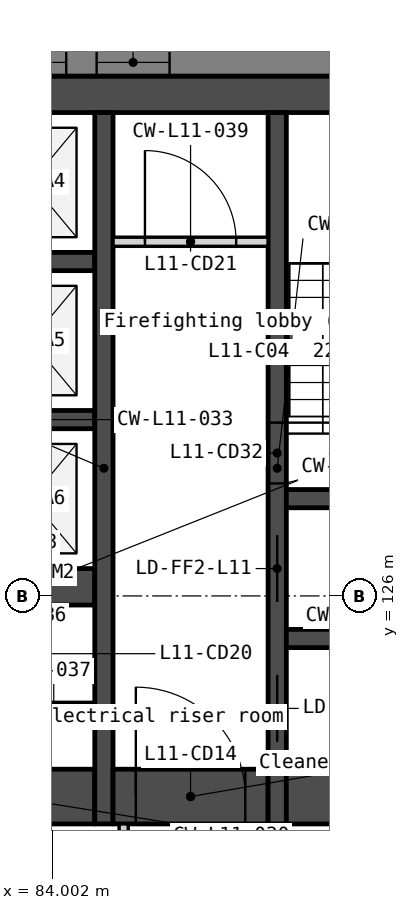
"""IFC4 building model, lengths in metres.
Left out: names, types, materials, properties, quantities, classifications, styles, units other than length and angle.
Written with IfcOpenShell. Run it as: python <this file> out.ifc"""

import sys

from ifc_helpers import new_model, si_unit, direction, frame, frame_2d, origin, place, context, subcontext, project, spatial, polyline, rectangle, outline, extrude, element, fill, save


model = new_model("IFC4")
c1 = context("Model", 3, precision=1e-05, world=origin(), true_north=direction((0.0, 1.0)))
c2 = subcontext(c1, "Body", "Model", "MODEL_VIEW")
j1 = project(units=[si_unit("LENGTHUNIT", "METRE"), si_unit("PLANEANGLEUNIT", "RADIAN")], contexts=[c1])
p1 = place(None, origin())
s1 = spatial("IfcSite", under=j1, at=p1, CompositionType="ELEMENT")
p2 = place(p1, origin())
s2 = spatial("IfcBuilding", under=s1, at=p2, CompositionType="ELEMENT")
p3 = place(p2, frame((0.0, 0.0, 52.5)))
s3 = spatial("IfcBuildingStorey", under=s2, at=p3, CompositionType="ELEMENT", Elevation=52.5)
p4 = place(p3, frame((66.0, 134.25, 0.0), z_axis=(0.0, 0.0, 1.0), x_axis=(1.0, 0.0, 0.0)))
e1 = element("IfcWall", 1, at=p4, inside=s3, PredefinedType="SOLIDWALL", context=c2, shape_type="SweptSolid", body=[
    extrude(rectangle(XDim=28.0, YDim=0.6, at=frame_2d((14.0, 0.0))), origin(), (0.0, 0.0, 1.0), 3.35),
])
p5 = place(p3, frame((81.8, 122.7, 0.0), z_axis=(0.0, 0.0, 1.0), x_axis=(1.0, 0.0, 0.0)))
e2 = element("IfcWall", 2, at=p5, inside=s3, PredefinedType="SOLIDWALL", context=c2, shape_type="SweptSolid", body=[
    extrude(rectangle(XDim=2.9, YDim=0.9, at=frame_2d((1.45, 0.0))), origin(), (0.0, 0.0, 1.0), 3.35),
])
p6 = place(p5, frame((0.05, 0.0, 0.0)))
e3 = element("IfcOpeningElement", 3, at=p6, cuts=e2, PredefinedType="OPENING", context=c2, shape_type="SweptSolid", body=[
    extrude(rectangle(XDim=1.5, YDim=2.1, at=frame_2d((0.75, 1.05))), frame((0.0, 0.46, 0.0), z_axis=(0.0, -1.0, 0.0), x_axis=(1.0, 0.0, 0.0)), (0.0, 0.0, 1.0), 0.92),
])
for number, where, z_axis, x_axis in (
    (4, (82.6, 131.5, 0.0), (0.0, 0.0, 1.0), (1.0, 0.0, 0.0)),
    (5, (82.6, 128.9, 0.0), (0.0, 0.0, 1.0), (1.0, 0.0, 0.0)),
):
    element("IfcWall", number, at=place(p3, frame(where, z_axis=z_axis, x_axis=x_axis)), inside=s3, PredefinedType="SOLIDWALL", context=c2, shape_type="SweptSolid", body=[
        extrude(rectangle(XDim=2.1, YDim=0.3, at=frame_2d((1.05, 0.0))), origin(), (0.0, 0.0, 1.0), 3.35),
    ])
p7 = place(p3, frame((82.6, 126.15, 0.0), z_axis=(0.0, 0.0, 1.0), x_axis=(1.0, 0.0, 0.0)))
e6 = element("IfcWall", 6, at=p7, inside=s3, PredefinedType="SOLIDWALL", context=c2, shape_type="SweptSolid", body=[
    extrude(rectangle(XDim=2.1, YDim=0.6, at=frame_2d((1.05, 0.0))), origin(), (0.0, 0.0, 1.0), 3.35),
])
p8 = place(p3, frame((83.35, 124.175, 0.0), z_axis=(0.0, 0.0, 1.0), x_axis=(1.0, 0.0, 0.0)))
e7 = element("IfcWall", 7, at=p8, inside=s3, PredefinedType="PARTITIONING", context=c2, shape_type="SweptSolid", body=[
    extrude(rectangle(XDim=1.35, YDim=0.15, at=frame_2d((0.675, 0.0))), origin(), (0.0, 0.0, 1.0), 3.35),
])
p9 = place(p3, frame((84.85, 133.95, 0.0), z_axis=(0.0, 0.0, 1.0), x_axis=(0.0, -1.0, 0.0)))
e8 = element("IfcWall", 8, at=p9, inside=s3, PredefinedType="SOLIDWALL", context=c2, shape_type="SweptSolid", body=[
    extrude(rectangle(XDim=11.7, YDim=0.3, at=frame_2d((5.85, 0.0))), origin(), (0.0, 0.0, 1.0), 3.35),
])
p10 = place(p3, frame((85.0, 131.825, 0.0), z_axis=(0.0, 0.0, 1.0), x_axis=(1.0, 0.0, 0.0)))
e9 = element("IfcWall", 9, at=p10, inside=s3, PredefinedType="PARTITIONING", context=c2, shape_type="SweptSolid", body=[
    extrude(rectangle(XDim=2.55, YDim=0.15, at=frame_2d((1.275, 0.0))), origin(), (0.0, 0.0, 1.0), 3.35),
])
p11 = place(p10, frame((0.525, 0.0, 0.0)))
e10 = element("IfcOpeningElement", 10, at=p11, cuts=e9, PredefinedType="OPENING", context=c2, shape_type="SweptSolid", body=[
    extrude(rectangle(XDim=1.5, YDim=2.1, at=frame_2d((0.75, 1.05))), frame((0.0, 0.085, 0.0), z_axis=(0.0, -1.0, 0.0), x_axis=(1.0, 0.0, 0.0)), (0.0, 0.0, 1.0), 0.17),
])
p12 = place(p3, frame((85.0, 122.7, 0.0), z_axis=(0.0, 0.0, 1.0), x_axis=(1.0, 0.0, 0.0)))
e11 = element("IfcWall", 11, at=p12, inside=s3, PredefinedType="SOLIDWALL", context=c2, shape_type="SweptSolid", body=[
    extrude(rectangle(XDim=2.55, YDim=0.9, at=frame_2d((1.275, 0.0))), origin(), (0.0, 0.0, 1.0), 3.35),
])
p13 = place(p12, frame((0.375, 0.0, 0.0)))
e12 = element("IfcOpeningElement", 12, at=p13, cuts=e11, PredefinedType="OPENING", context=c2, shape_type="SweptSolid", body=[
    extrude(rectangle(XDim=1.8, YDim=2.1, at=frame_2d((0.9, 1.05))), frame((0.0, 0.46, 0.0), z_axis=(0.0, -1.0, 0.0), x_axis=(1.0, 0.0, 0.0)), (0.0, 0.0, 1.0), 0.92),
])
p14 = place(p3, frame((85.175, 122.25, 0.0), z_axis=(0.0, 0.0, 1.0), x_axis=(0.0, -1.0, 0.0)))
e13 = element("IfcWall", 13, at=p14, inside=s3, PredefinedType="PARTITIONING", context=c2, shape_type="SweptSolid", body=[
    extrude(rectangle(XDim=2.1, YDim=0.15, at=frame_2d((1.05, 0.0))), origin(), (0.0, 0.0, 1.0), 3.35),
])
p15 = place(p14, frame((0.55, 0.0, 0.0)))
e14 = element("IfcOpeningElement", 14, at=p15, cuts=e13, PredefinedType="OPENING", context=c2, shape_type="SweptSolid", body=[
    extrude(rectangle(XDim=1.0, YDim=2.1, at=frame_2d((0.5, 1.05))), frame((0.0, 0.085, 0.0), z_axis=(0.0, -1.0, 0.0), x_axis=(1.0, 0.0, 0.0)), (0.0, 0.0, 1.0), 0.17),
])
p16 = place(p3, frame((87.375, 122.25, 0.0), z_axis=(0.0, 0.0, 1.0), x_axis=(0.0, -1.0, 0.0)))
e15 = element("IfcWall", 15, at=p16, inside=s3, PredefinedType="PARTITIONING", context=c2, shape_type="SweptSolid", body=[
    extrude(rectangle(XDim=2.1, YDim=0.15, at=frame_2d((1.05, 0.0))), origin(), (0.0, 0.0, 1.0), 3.35),
])
p17 = place(p3, frame((87.7, 133.95, 0.0), z_axis=(0.0, 0.0, 1.0), x_axis=(0.0, -1.0, 0.0)))
e16 = element("IfcWall", 16, at=p17, inside=s3, PredefinedType="SOLIDWALL", context=c2, shape_type="SweptSolid", body=[
    extrude(rectangle(XDim=11.7, YDim=0.3, at=frame_2d((5.85, 0.0))), origin(), (0.0, 0.0, 1.0), 3.35),
])
p18 = place(p17, frame((6.95, 0.0, 0.0)))
e17 = element("IfcOpeningElement", 17, at=p18, cuts=e16, PredefinedType="OPENING", context=c2, shape_type="SweptSolid", body=[
    extrude(rectangle(XDim=1.1, YDim=2.1, at=frame_2d((0.55, 1.05))), frame((0.0, 0.16, 0.0), z_axis=(0.0, -1.0, 0.0), x_axis=(1.0, 0.0, 0.0)), (0.0, 0.0, 1.0), 0.32),
])
p19 = place(p17, frame((5.1, 0.0, 0.0)))
e18 = element("IfcOpeningElement", 18, at=p19, cuts=e16, PredefinedType="OPENING", context=c2, shape_type="SweptSolid", body=[
    extrude(rectangle(XDim=1.0, YDim=2.1, at=frame_2d((0.5, 1.05))), frame((0.0, 0.16, 0.0), z_axis=(0.0, -1.0, 0.0), x_axis=(1.0, 0.0, 0.0)), (0.0, 0.0, 1.0), 0.32),
])
p20 = place(p17, frame((9.25, 0.0, 0.0)))
e19 = element("IfcOpeningElement", 19, at=p20, cuts=e16, PredefinedType="OPENING", context=c2, shape_type="SweptSolid", body=[
    extrude(rectangle(XDim=1.1, YDim=2.1, at=frame_2d((0.55, 1.05))), frame((0.0, 0.16, 0.0), z_axis=(0.0, -1.0, 0.0), x_axis=(1.0, 0.0, 0.0)), (0.0, 0.0, 1.0), 0.32),
])
for number, where, z_axis, x_axis in (
    (20, (87.85, 127.6, 0.0), (0.0, 0.0, 1.0), (1.0, 0.0, 0.0)),
    (21, (87.85, 125.3, 0.0), (0.0, 0.0, 1.0), (1.0, 0.0, 0.0)),
):
    element("IfcWall", number, at=place(p3, frame(where, z_axis=z_axis, x_axis=x_axis)), inside=s3, PredefinedType="SOLIDWALL", context=c2, shape_type="SweptSolid", body=[
        extrude(rectangle(XDim=2.55, YDim=0.3, at=frame_2d((1.275, 0.0))), origin(), (0.0, 0.0, 1.0), 3.35),
    ])
p21 = place(p3, frame((87.85, 122.7, 0.0), z_axis=(0.0, 0.0, 1.0), x_axis=(1.0, 0.0, 0.0)))
e22 = element("IfcWall", 22, at=p21, inside=s3, PredefinedType="SOLIDWALL", context=c2, shape_type="SweptSolid", body=[
    extrude(rectangle(XDim=2.55, YDim=0.9, at=frame_2d((1.275, 0.0))), origin(), (0.0, 0.0, 1.0), 3.35),
])
p22 = place(p3, frame((102.4, 134.775, -0.15), z_axis=(0.0, 0.0, 1.0), x_axis=(-1.0, 0.0, 0.0)))
e23 = element("IfcWall", 23, at=p22, inside=s3, PredefinedType="SOLIDWALL", context=c2, shape_type="SweptSolid", body=[
    extrude(outline(polyline([(44.8, 0.0), (44.8, 3.5), (0.0, 3.5), (0.0, 0.0), (44.8, 0.0)])), frame((0.0, 0.225, 0.0), z_axis=(0.0, -1.0, 0.0), x_axis=(1.0, 0.0, 0.0)), (0.0, 0.0, 1.0), 0.45),
])
p23 = place(p22, frame((0.722, 0.0, 1.05)))
e24 = element("IfcOpeningElement", 24, at=p23, cuts=e23, PredefinedType="OPENING", context=c2, shape_type="SweptSolid", body=[
    extrude(rectangle(XDim=1.2, YDim=1.5, at=frame_2d((0.6, 0.75))), frame((0.0, 0.235, 0.0), z_axis=(0.0, -1.0, 0.0), x_axis=(1.0, 0.0, 0.0)), (0.0, 0.0, 1.0), 0.47),
])
p24 = place(p22, frame((7.51, 0.0, 1.05)))
e25 = element("IfcOpeningElement", 25, at=p24, cuts=e23, PredefinedType="OPENING", context=c2, shape_type="SweptSolid", body=[
    extrude(rectangle(XDim=1.2, YDim=1.5, at=frame_2d((0.6, 0.75))), frame((0.0, 0.235, 0.0), z_axis=(0.0, -1.0, 0.0), x_axis=(1.0, 0.0, 0.0)), (0.0, 0.0, 1.0), 0.47),
])
p25 = place(p22, frame((9.21, 0.0, 1.05)))
e26 = element("IfcOpeningElement", 26, at=p25, cuts=e23, PredefinedType="OPENING", context=c2, shape_type="SweptSolid", body=[
    extrude(rectangle(XDim=1.2, YDim=1.5, at=frame_2d((0.6, 0.75))), frame((0.0, 0.235, 0.0), z_axis=(0.0, -1.0, 0.0), x_axis=(1.0, 0.0, 0.0)), (0.0, 0.0, 1.0), 0.47),
])
p26 = place(p22, frame((16.47, 0.0, 1.05)))
e27 = element("IfcOpeningElement", 27, at=p26, cuts=e23, PredefinedType="OPENING", context=c2, shape_type="SweptSolid", body=[
    extrude(rectangle(XDim=1.2, YDim=1.5, at=frame_2d((0.6, 0.75))), frame((0.0, 0.235, 0.0), z_axis=(0.0, -1.0, 0.0), x_axis=(1.0, 0.0, 0.0)), (0.0, 0.0, 1.0), 0.47),
])
p27 = place(p22, frame((18.17, 0.0, 1.05)))
e28 = element("IfcOpeningElement", 28, at=p27, cuts=e23, PredefinedType="OPENING", context=c2, shape_type="SweptSolid", body=[
    extrude(rectangle(XDim=1.2, YDim=1.5, at=frame_2d((0.6, 0.75))), frame((0.0, 0.235, 0.0), z_axis=(0.0, -1.0, 0.0), x_axis=(1.0, 0.0, 0.0)), (0.0, 0.0, 1.0), 0.47),
])
p28 = place(p22, frame((25.43, 0.0, 1.05)))
e29 = element("IfcOpeningElement", 29, at=p28, cuts=e23, PredefinedType="OPENING", context=c2, shape_type="SweptSolid", body=[
    extrude(rectangle(XDim=1.2, YDim=1.5, at=frame_2d((0.6, 0.75))), frame((0.0, 0.235, 0.0), z_axis=(0.0, -1.0, 0.0), x_axis=(1.0, 0.0, 0.0)), (0.0, 0.0, 1.0), 0.47),
])
p29 = place(p22, frame((27.13, 0.0, 1.05)))
e30 = element("IfcOpeningElement", 30, at=p29, cuts=e23, PredefinedType="OPENING", context=c2, shape_type="SweptSolid", body=[
    extrude(rectangle(XDim=1.2, YDim=1.5, at=frame_2d((0.6, 0.75))), frame((0.0, 0.235, 0.0), z_axis=(0.0, -1.0, 0.0), x_axis=(1.0, 0.0, 0.0)), (0.0, 0.0, 1.0), 0.47),
])
p30 = place(p22, frame((34.39, 0.0, 1.05)))
e31 = element("IfcOpeningElement", 31, at=p30, cuts=e23, PredefinedType="OPENING", context=c2, shape_type="SweptSolid", body=[
    extrude(rectangle(XDim=1.2, YDim=1.5, at=frame_2d((0.6, 0.75))), frame((0.0, 0.235, 0.0), z_axis=(0.0, -1.0, 0.0), x_axis=(1.0, 0.0, 0.0)), (0.0, 0.0, 1.0), 0.47),
])
p31 = place(p22, frame((36.09, 0.0, 1.05)))
e32 = element("IfcOpeningElement", 32, at=p31, cuts=e23, PredefinedType="OPENING", context=c2, shape_type="SweptSolid", body=[
    extrude(rectangle(XDim=1.2, YDim=1.5, at=frame_2d((0.6, 0.75))), frame((0.0, 0.235, 0.0), z_axis=(0.0, -1.0, 0.0), x_axis=(1.0, 0.0, 0.0)), (0.0, 0.0, 1.0), 0.47),
])
p32 = place(p22, frame((42.878, 0.0, 1.05)))
e33 = element("IfcOpeningElement", 33, at=p32, cuts=e23, PredefinedType="OPENING", context=c2, shape_type="SweptSolid", body=[
    extrude(rectangle(XDim=1.2, YDim=1.5, at=frame_2d((0.6, 0.75))), frame((0.0, 0.235, 0.0), z_axis=(0.0, -1.0, 0.0), x_axis=(1.0, 0.0, 0.0)), (0.0, 0.0, 1.0), 0.47),
])
p33 = place(p3, frame((83.105, 90.599, -0.15), z_axis=(0.0, 0.0, 1.0), x_axis=(0.499999201451, 0.866025864826, 0.0)))
e34 = element("IfcWall", 34, at=p33, inside=s3, PredefinedType="SOLIDWALL", context=c2, shape_type="SweptSolid", body=[
    extrude(outline(polyline([(44.8, 0.0), (44.8, 3.5), (0.0, 3.5), (0.0, 0.0), (44.8, 0.0)])), frame((0.0, 0.225, 0.0), z_axis=(0.0, -1.0, 0.0), x_axis=(1.0, 0.0, 0.0)), (0.0, 0.0, 1.0), 0.45),
])
p34 = place(p33, frame((0.722, 0.0, 1.05)))
e35 = element("IfcOpeningElement", 35, at=p34, cuts=e34, PredefinedType="OPENING", context=c2, shape_type="SweptSolid", body=[
    extrude(rectangle(XDim=1.2, YDim=1.5, at=frame_2d((0.6, 0.75))), frame((0.0, 0.235, 0.0), z_axis=(0.0, -1.0, 0.0), x_axis=(1.0, 0.0, 0.0)), (0.0, 0.0, 1.0), 0.47),
])
p35 = place(p33, frame((7.51, 0.0, 1.05)))
e36 = element("IfcOpeningElement", 36, at=p35, cuts=e34, PredefinedType="OPENING", context=c2, shape_type="SweptSolid", body=[
    extrude(rectangle(XDim=1.2, YDim=1.5, at=frame_2d((0.6, 0.75))), frame((0.0, 0.235, 0.0), z_axis=(0.0, -1.0, 0.0), x_axis=(1.0, 0.0, 0.0)), (0.0, 0.0, 1.0), 0.47),
])
p36 = place(p33, frame((9.21, 0.0, 1.05)))
e37 = element("IfcOpeningElement", 37, at=p36, cuts=e34, PredefinedType="OPENING", context=c2, shape_type="SweptSolid", body=[
    extrude(rectangle(XDim=1.2, YDim=1.5, at=frame_2d((0.6, 0.75))), frame((0.0, 0.235, 0.0), z_axis=(0.0, -1.0, 0.0), x_axis=(1.0, 0.0, 0.0)), (0.0, 0.0, 1.0), 0.47),
])
p37 = place(p33, frame((16.47, 0.0, 1.05)))
e38 = element("IfcOpeningElement", 38, at=p37, cuts=e34, PredefinedType="OPENING", context=c2, shape_type="SweptSolid", body=[
    extrude(rectangle(XDim=1.2, YDim=1.5, at=frame_2d((0.6, 0.75))), frame((0.0, 0.235, 0.0), z_axis=(0.0, -1.0, 0.0), x_axis=(1.0, 0.0, 0.0)), (0.0, 0.0, 1.0), 0.47),
])
p38 = place(p33, frame((18.17, 0.0, 1.05)))
e39 = element("IfcOpeningElement", 39, at=p38, cuts=e34, PredefinedType="OPENING", context=c2, shape_type="SweptSolid", body=[
    extrude(rectangle(XDim=1.2, YDim=1.5, at=frame_2d((0.6, 0.75))), frame((0.0, 0.235, 0.0), z_axis=(0.0, -1.0, 0.0), x_axis=(1.0, 0.0, 0.0)), (0.0, 0.0, 1.0), 0.47),
])
p39 = place(p33, frame((25.43, 0.0, 1.05)))
e40 = element("IfcOpeningElement", 40, at=p39, cuts=e34, PredefinedType="OPENING", context=c2, shape_type="SweptSolid", body=[
    extrude(rectangle(XDim=1.2, YDim=1.5, at=frame_2d((0.6, 0.75))), frame((0.0, 0.235, 0.0), z_axis=(0.0, -1.0, 0.0), x_axis=(1.0, 0.0, 0.0)), (0.0, 0.0, 1.0), 0.47),
])
p40 = place(p33, frame((27.13, 0.0, 1.05)))
e41 = element("IfcOpeningElement", 41, at=p40, cuts=e34, PredefinedType="OPENING", context=c2, shape_type="SweptSolid", body=[
    extrude(rectangle(XDim=1.2, YDim=1.5, at=frame_2d((0.6, 0.75))), frame((0.0, 0.235, 0.0), z_axis=(0.0, -1.0, 0.0), x_axis=(1.0, 0.0, 0.0)), (0.0, 0.0, 1.0), 0.47),
])
p41 = place(p33, frame((34.39, 0.0, 1.05)))
e42 = element("IfcOpeningElement", 42, at=p41, cuts=e34, PredefinedType="OPENING", context=c2, shape_type="SweptSolid", body=[
    extrude(rectangle(XDim=1.2, YDim=1.5, at=frame_2d((0.6, 0.75))), frame((0.0, 0.235, 0.0), z_axis=(0.0, -1.0, 0.0), x_axis=(1.0, 0.0, 0.0)), (0.0, 0.0, 1.0), 0.47),
])
p42 = place(p33, frame((36.09, 0.0, 1.05)))
e43 = element("IfcOpeningElement", 43, at=p42, cuts=e34, PredefinedType="OPENING", context=c2, shape_type="SweptSolid", body=[
    extrude(rectangle(XDim=1.2, YDim=1.5, at=frame_2d((0.6, 0.75))), frame((0.0, 0.235, 0.0), z_axis=(0.0, -1.0, 0.0), x_axis=(1.0, 0.0, 0.0)), (0.0, 0.0, 1.0), 0.47),
])
p43 = place(p33, frame((42.878, 0.0, 1.05)))
e44 = element("IfcOpeningElement", 44, at=p43, cuts=e34, PredefinedType="OPENING", context=c2, shape_type="SweptSolid", body=[
    extrude(rectangle(XDim=1.2, YDim=1.5, at=frame_2d((0.6, 0.75))), frame((0.0, 0.235, 0.0), z_axis=(0.0, -1.0, 0.0), x_axis=(1.0, 0.0, 0.0)), (0.0, 0.0, 1.0), 0.47),
])
p44 = place(p18, origin())
e45 = element("IfcDoor", 45, at=p44, inside=s3, OperationType="SLIDING_TO_LEFT", PredefinedType="DOOR", context=c2, shape_type="SweptSolid", body=[
    extrude(rectangle(XDim=1.1, YDim=2.1, at=frame_2d((0.55, 1.05))), frame((0.0, 0.025, 0.0), z_axis=(0.0, -1.0, 0.0), x_axis=(1.0, 0.0, 0.0)), (0.0, 0.0, 1.0), 0.05),
])
fill(e17, e45)
p45 = place(p13, origin())
e46 = element("IfcDoor", 46, at=p45, inside=s3, OperationType="DOUBLE_DOOR_DOUBLE_SWING", PredefinedType="DOOR", context=c2, shape_type="SweptSolid", body=[
    extrude(rectangle(XDim=1.8, YDim=2.1, at=frame_2d((0.9, 1.05))), frame((0.0, 0.025, 0.0), z_axis=(0.0, -1.0, 0.0), x_axis=(1.0, 0.0, 0.0)), (0.0, 0.0, 1.0), 0.05),
])
fill(e12, e46)
p46 = place(p11, origin())
e47 = element("IfcDoor", 47, at=p46, inside=s3, OperationType="DOUBLE_DOOR_DOUBLE_SWING", PredefinedType="DOOR", context=c2, shape_type="SweptSolid", body=[
    extrude(rectangle(XDim=1.5, YDim=2.1, at=frame_2d((0.75, 1.05))), frame((0.0, 0.025, 0.0), z_axis=(0.0, -1.0, 0.0), x_axis=(1.0, 0.0, 0.0)), (0.0, 0.0, 1.0), 0.05),
])
fill(e10, e47)
p47 = place(p19, origin())
e48 = element("IfcDoor", 48, at=p47, inside=s3, OperationType="SINGLE_SWING_LEFT", PredefinedType="DOOR", context=c2, shape_type="SweptSolid", body=[
    extrude(rectangle(XDim=1.0, YDim=2.1, at=frame_2d((0.5, 1.05))), frame((0.0, 0.025, 0.0), z_axis=(0.0, -1.0, 0.0), x_axis=(1.0, 0.0, 0.0)), (0.0, 0.0, 1.0), 0.05),
])
fill(e18, e48)
p48 = place(p20, origin())
e49 = element("IfcDoor", 49, at=p48, inside=s3, OperationType="SLIDING_TO_LEFT", PredefinedType="DOOR", context=c2, shape_type="SweptSolid", body=[
    extrude(rectangle(XDim=1.1, YDim=2.1, at=frame_2d((0.55, 1.05))), frame((0.0, 0.025, 0.0), z_axis=(0.0, -1.0, 0.0), x_axis=(1.0, 0.0, 0.0)), (0.0, 0.0, 1.0), 0.05),
])
fill(e19, e49)
p49 = place(p26, origin())
e50 = element("IfcWindow", 50, at=p49, inside=s3, PartitioningType="SINGLE_PANEL", PredefinedType="WINDOW", context=c2, shape_type="SweptSolid", body=[
    extrude(rectangle(XDim=1.2, YDim=1.5, at=frame_2d((0.6, 0.75))), frame((0.0, 0.03, 0.0), z_axis=(0.0, -1.0, 0.0), x_axis=(1.0, 0.0, 0.0)), (0.0, 0.0, 1.0), 0.06),
])
fill(e27, e50)
p50 = place(p27, origin())
e51 = element("IfcWindow", 51, at=p50, inside=s3, PartitioningType="SINGLE_PANEL", PredefinedType="WINDOW", context=c2, shape_type="SweptSolid", body=[
    extrude(rectangle(XDim=1.2, YDim=1.5, at=frame_2d((0.6, 0.75))), frame((0.0, 0.03, 0.0), z_axis=(0.0, -1.0, 0.0), x_axis=(1.0, 0.0, 0.0)), (0.0, 0.0, 1.0), 0.06),
])
fill(e28, e51)
save(model, sys.argv[1])
